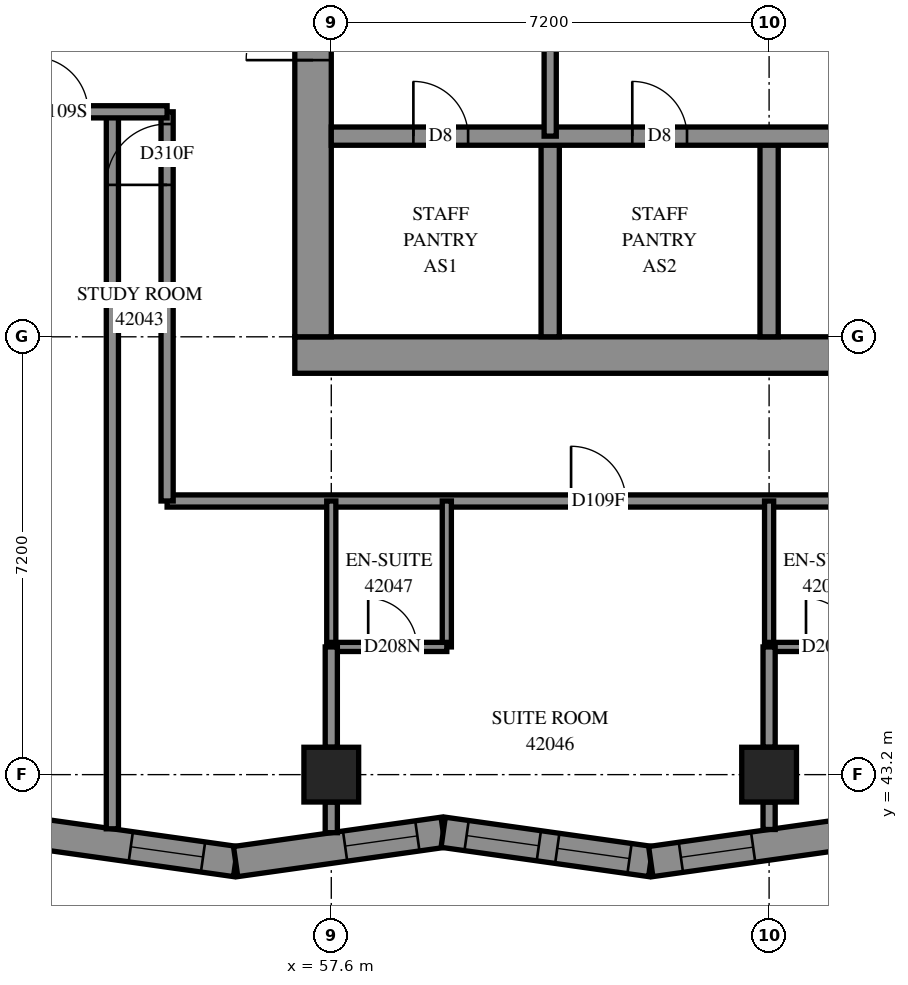
"""IFC4 building model, lengths in metres.
Left out: names, types, materials, properties, quantities, classifications, styles, units other than length and angle.
Written with IfcOpenShell. Run it as: python <this file> out.ifc"""

import sys

from ifc_helpers import new_model, si_unit, direction, frame, frame_2d, origin, origin_2d, place, context, subcontext, project, spatial, polyline, rectangle, outline, extrude, element, fill, save


model = new_model("IFC4")
c1 = context("Model", 3, precision=1e-05, world=origin(), true_north=direction((0.0, 1.0)))
c2 = subcontext(c1, "Body", "Model", "MODEL_VIEW")
j1 = project(units=[si_unit("LENGTHUNIT", "METRE"), si_unit("PLANEANGLEUNIT", "RADIAN")], contexts=[c1])
p1 = place(None, origin())
s1 = spatial("IfcSite", under=j1, at=p1, CompositionType="ELEMENT")
p2 = place(p1, origin())
s2 = spatial("IfcBuilding", under=s1, at=p2, CompositionType="ELEMENT")
p3 = place(p2, frame((0.0, 0.0, 155.8)))
s3 = spatial("IfcBuildingStorey", under=s2, at=p3, CompositionType="ELEMENT", Elevation=155.8)
for number, where, z_axis, x_axis in (
    (1, (57.6, 43.2, 0.0), (0.0, 0.0, 1.0), (1.0, 0.0, 0.0)),
    (2, (64.8, 43.2, 0.0), (0.0, 0.0, 1.0), (1.0, 0.0, 0.0)),
):
    element("IfcColumn", number, at=place(p3, frame(where, z_axis=z_axis, x_axis=x_axis)), inside=s3, PredefinedType="COLUMN", context=c2, shape_type="SweptSolid", body=[
        extrude(rectangle(XDim=0.9, YDim=0.9, at=origin_2d()), origin(), (0.0, 0.0, 1.0), 3.1),
    ])
p4 = place(p3, frame((57.0, 50.1, -0.3), z_axis=(0.0, 0.0, 1.0), x_axis=(1.0, 0.0, 0.0)))
e3 = element("IfcWall", 3, at=p4, inside=s3, PredefinedType="SHEAR", context=c2, shape_type="SweptSolid", body=[
    extrude(rectangle(XDim=15.6, YDim=0.6, at=frame_2d((7.8, 0.0))), origin(), (0.0, 0.0, 1.0), 2.7),
])
p5 = place(p3, frame((57.3, 50.4, -0.3), z_axis=(0.0, 0.0, 1.0), x_axis=(0.0, 1.0, 0.0)))
e4 = element("IfcWall", 4, at=p5, inside=s3, PredefinedType="SHEAR", context=c2, shape_type="SweptSolid", body=[
    extrude(rectangle(XDim=14.4, YDim=0.6, at=frame_2d((7.2, 0.0))), origin(), (0.0, 0.0, 1.0), 2.7),
])
p6 = place(p5, frame((4.55, 0.0, 0.3)))
e5 = element("IfcOpeningElement", 5, at=p6, cuts=e4, PredefinedType="OPENING", context=c2, shape_type="SweptSolid", body=[
    extrude(rectangle(XDim=1.1, YDim=2.1, at=frame_2d((0.55, 1.05))), frame((0.0, 0.31, 0.0), z_axis=(0.0, -1.0, 0.0), x_axis=(1.0, 0.0, 0.0)), (0.0, 0.0, 1.0), 0.62),
])
p7 = place(p5, frame((11.35, 0.0, 0.3)))
e6 = element("IfcOpeningElement", 6, at=p7, cuts=e4, PredefinedType="OPENING", context=c2, shape_type="SweptSolid", body=[
    extrude(rectangle(XDim=1.1, YDim=2.1, at=frame_2d((0.55, 1.05))), frame((0.0, 0.31, 0.0), z_axis=(0.0, -1.0, 0.0), x_axis=(1.0, 0.0, 0.0)), (0.0, 0.0, 1.0), 0.62),
])
for number, where, z_axis, x_axis in (
    (7, (61.2, 50.4, 0.0), (0.0, 0.0, 1.0), (0.0, 1.0, 0.0)),
    (8, (64.8, 50.4, 0.0), (0.0, 0.0, 1.0), (0.0, 1.0, 0.0)),
):
    element("IfcWall", number, at=place(p3, frame(where, z_axis=z_axis, x_axis=x_axis)), inside=s3, PredefinedType="SOLIDWALL", context=c2, shape_type="SweptSolid", body=[
        extrude(rectangle(XDim=3.3, YDim=0.3, at=frame_2d((1.65, 0.0))), origin(), (0.0, 0.0, 1.0), 3.1),
    ])
p8 = place(p3, frame((57.6, 53.7, 0.0), z_axis=(0.0, 0.0, 1.0), x_axis=(1.0, 0.0, 0.0)))
e9 = element("IfcWall", 9, at=p8, inside=s3, PredefinedType="SOLIDWALL", context=c2, shape_type="SweptSolid", body=[
    extrude(rectangle(XDim=14.4, YDim=0.3, at=frame_2d((7.2, 0.0))), origin(), (0.0, 0.0, 1.0), 3.1),
])
p9 = place(p8, frame((1.35, 0.0, 0.0)))
e10 = element("IfcOpeningElement", 10, at=p9, cuts=e9, PredefinedType="OPENING", context=c2, shape_type="SweptSolid", body=[
    extrude(rectangle(XDim=0.9, YDim=2.1, at=frame_2d((0.45, 1.05))), frame((0.0, 0.16, 0.0), z_axis=(0.0, -1.0, 0.0), x_axis=(1.0, 0.0, 0.0)), (0.0, 0.0, 1.0), 0.32),
])
p10 = place(p8, frame((4.95, 0.0, 0.0)))
e11 = element("IfcOpeningElement", 11, at=p10, cuts=e9, PredefinedType="OPENING", context=c2, shape_type="SweptSolid", body=[
    extrude(rectangle(XDim=0.9, YDim=2.1, at=frame_2d((0.45, 1.05))), frame((0.0, 0.16, 0.0), z_axis=(0.0, -1.0, 0.0), x_axis=(1.0, 0.0, 0.0)), (0.0, 0.0, 1.0), 0.32),
])
p11 = place(p8, frame((8.55, 0.0, 0.0)))
e12 = element("IfcOpeningElement", 12, at=p11, cuts=e9, PredefinedType="OPENING", context=c2, shape_type="SweptSolid", body=[
    extrude(rectangle(XDim=0.9, YDim=2.1, at=frame_2d((0.45, 1.05))), frame((0.0, 0.16, 0.0), z_axis=(0.0, -1.0, 0.0), x_axis=(1.0, 0.0, 0.0)), (0.0, 0.0, 1.0), 0.32),
])
p12 = place(p8, frame((12.05, 0.0, 0.0)))
e13 = element("IfcOpeningElement", 13, at=p12, cuts=e9, PredefinedType="OPENING", context=c2, shape_type="SweptSolid", body=[
    extrude(rectangle(XDim=1.1, YDim=2.1, at=frame_2d((0.55, 1.05))), frame((0.0, 0.16, 0.0), z_axis=(0.0, -1.0, 0.0), x_axis=(1.0, 0.0, 0.0)), (0.0, 0.0, 1.0), 0.32),
])
p13 = place(p3, frame((52.592, 42.255, 0.0), z_axis=(0.0, 0.0, 1.0), x_axis=(0.9901776599, -0.1398148844, 0.0)))
e14 = element("IfcWall", 14, at=p13, inside=s3, PredefinedType="SOLIDWALL", context=c2, shape_type="SweptSolid", body=[
    extrude(outline(polyline([(0.057, -0.25), (3.504, -0.25), (3.434, 0.25), (-0.057, 0.25), (0.057, -0.25)])), origin(), (0.0, 0.0, 1.0), 3.1),
])
p14 = place(p13, frame((1.728, 0.0, 0.45)))
e15 = element("IfcOpeningElement", 15, at=p14, cuts=e14, PredefinedType="OPENING", context=c2, shape_type="SweptSolid", body=[
    extrude(rectangle(XDim=1.2, YDim=2.5, at=frame_2d((0.6, 1.25))), frame((0.0, 0.26, 0.0), z_axis=(0.0, -1.0, 0.0), x_axis=(1.0, 0.0, 0.0)), (0.0, 0.0, 1.0), 0.52),
])
p15 = place(p3, frame((56.027, 41.77, 0.0), z_axis=(0.0, 0.0, 1.0), x_axis=(0.9901773547, 0.1398170455, 0.0)))
e16 = element("IfcWall", 16, at=p15, inside=s3, PredefinedType="SOLIDWALL", context=c2, shape_type="SweptSolid", body=[
    extrude(outline(polyline([(-0.035, -0.25), (3.412, -0.25), (3.483, 0.25), (0.035, 0.25), (-0.035, -0.25)])), origin(), (0.0, 0.0, 1.0), 3.1),
])
p16 = place(p15, frame((1.818, 0.0, 0.45)))
e17 = element("IfcOpeningElement", 17, at=p16, cuts=e16, PredefinedType="OPENING", context=c2, shape_type="SweptSolid", body=[
    extrude(rectangle(XDim=1.2, YDim=2.5, at=frame_2d((0.6, 1.25))), frame((0.0, 0.26, 0.0), z_axis=(0.0, -1.0, 0.0), x_axis=(1.0, 0.0, 0.0)), (0.0, 0.0, 1.0), 0.52),
])
p17 = place(p3, frame((59.44, 42.252, 0.0), z_axis=(0.0, 0.0, 1.0), x_axis=(0.9901773547, -0.1398170455, 0.0)))
e18 = element("IfcWall", 18, at=p17, inside=s3, PredefinedType="SOLIDWALL", context=c2, shape_type="SweptSolid", body=[
    extrude(outline(polyline([(0.035, -0.25), (3.483, -0.25), (3.412, 0.25), (-0.035, 0.25), (0.035, -0.25)])), origin(), (0.0, 0.0, 1.0), 3.1),
])
p18 = place(p17, frame((0.389, 0.0, 0.45)))
e19 = element("IfcOpeningElement", 19, at=p18, cuts=e18, PredefinedType="OPENING", context=c2, shape_type="SweptSolid", body=[
    extrude(rectangle(XDim=1.2, YDim=2.5, at=frame_2d((0.6, 1.25))), frame((0.0, 0.26, 0.0), z_axis=(0.0, -1.0, 0.0), x_axis=(1.0, 0.0, 0.0)), (0.0, 0.0, 1.0), 0.52),
])
p19 = place(p17, frame((1.895, 0.0, 0.45)))
e20 = element("IfcOpeningElement", 20, at=p19, cuts=e18, PredefinedType="OPENING", context=c2, shape_type="SweptSolid", body=[
    extrude(rectangle(XDim=1.2, YDim=2.5, at=frame_2d((0.6, 1.25))), frame((0.0, 0.26, 0.0), z_axis=(0.0, -1.0, 0.0), x_axis=(1.0, 0.0, 0.0)), (0.0, 0.0, 1.0), 0.52),
])
p20 = place(p3, frame((62.854, 41.77, 0.0), z_axis=(0.0, 0.0, 1.0), x_axis=(0.9901767876, 0.1398210616, 0.0)))
e21 = element("IfcWall", 21, at=p20, inside=s3, PredefinedType="SOLIDWALL", context=c2, shape_type="SweptSolid", body=[
    extrude(outline(polyline([(-0.035, -0.25), (3.412, -0.25), (3.483, 0.25), (0.035, 0.25), (-0.035, -0.25)])), origin(), (0.0, 0.0, 1.0), 3.1),
])
p21 = place(p20, frame((0.5, 0.0, 0.45)))
e22 = element("IfcOpeningElement", 22, at=p21, cuts=e21, PredefinedType="OPENING", context=c2, shape_type="SweptSolid", body=[
    extrude(rectangle(XDim=1.2, YDim=2.5, at=frame_2d((0.6, 1.25))), frame((0.0, 0.26, 0.0), z_axis=(0.0, -1.0, 0.0), x_axis=(1.0, 0.0, 0.0)), (0.0, 0.0, 1.0), 0.52),
])
p22 = place(p3, frame((61.2, 53.7, 0.0), z_axis=(0.0, 0.0, 1.0), x_axis=(0.0, 1.0, 0.0)))
e23 = element("IfcWall", 23, at=p22, inside=s3, PredefinedType="PARTITIONING", context=c2, shape_type="SweptSolid", body=[
    extrude(rectangle(XDim=3.6, YDim=0.2, at=frame_2d((1.8, 0.0))), origin(), (0.0, 0.0, 1.0), 3.1),
])
p23 = place(p3, frame((54.9, 47.7, 0.0), z_axis=(0.0, 0.0, 1.0), x_axis=(1.0, 0.0, 0.0)))
e24 = element("IfcWall", 24, at=p23, inside=s3, PredefinedType="PARTITIONING", context=c2, shape_type="SweptSolid", body=[
    extrude(rectangle(XDim=19.326, YDim=0.2, at=frame_2d((9.663, 0.0))), origin(), (0.0, 0.0, 1.0), 3.1),
])
p24 = place(p23, frame((6.643, 0.0, 0.0)))
e25 = element("IfcOpeningElement", 25, at=p24, cuts=e24, PredefinedType="OPENING", context=c2, shape_type="SweptSolid", body=[
    extrude(rectangle(XDim=0.9, YDim=2.1, at=frame_2d((0.45, 1.05))), frame((0.0, 0.11, 0.0), z_axis=(0.0, -1.0, 0.0), x_axis=(1.0, 0.0, 0.0)), (0.0, 0.0, 1.0), 0.22),
])
p25 = place(p23, frame((13.843, 0.0, 0.0)))
e26 = element("IfcOpeningElement", 26, at=p25, cuts=e24, PredefinedType="OPENING", context=c2, shape_type="SweptSolid", body=[
    extrude(rectangle(XDim=0.9, YDim=2.1, at=frame_2d((0.45, 1.05))), frame((0.0, 0.11, 0.0), z_axis=(0.0, -1.0, 0.0), x_axis=(1.0, 0.0, 0.0)), (0.0, 0.0, 1.0), 0.22),
])
p26 = place(p3, frame((54.0, 42.309, 0.0), z_axis=(0.0, 0.0, 1.0), x_axis=(0.0, 1.0, 0.0)))
e27 = element("IfcWall", 27, at=p26, inside=s3, PredefinedType="PARTITIONING", context=c2, shape_type="SweptSolid", body=[
    extrude(rectangle(XDim=11.791, YDim=0.2, at=frame_2d((5.895, 0.0))), origin(), (0.0, 0.0, 1.0), 3.1),
])
p27 = place(p3, frame((54.9, 47.7, 0.0), z_axis=(0.0, 0.0, 1.0), x_axis=(0.0, 1.0, 0.0)))
e28 = element("IfcWall", 28, at=p27, inside=s3, PredefinedType="PARTITIONING", context=c2, shape_type="SweptSolid", body=[
    extrude(rectangle(XDim=6.4, YDim=0.2, at=frame_2d((3.2, 0.0))), origin(), (0.0, 0.0, 1.0), 3.1),
])
p28 = place(p27, frame((5.199, 0.0, 0.0)))
e29 = element("IfcOpeningElement", 29, at=p28, cuts=e28, PredefinedType="OPENING", context=c2, shape_type="SweptSolid", body=[
    extrude(rectangle(XDim=1.0, YDim=2.1, at=frame_2d((0.5, 1.05))), frame((0.0, 0.11, 0.0), z_axis=(0.0, -1.0, 0.0), x_axis=(1.0, 0.0, 0.0)), (0.0, 0.0, 1.0), 0.22),
])
p29 = place(p3, frame((50.4, 54.1, 0.0), z_axis=(0.0, 0.0, 1.0), x_axis=(1.0, 0.0, 0.0)))
e30 = element("IfcWall", 30, at=p29, inside=s3, PredefinedType="PARTITIONING", context=c2, shape_type="SweptSolid", body=[
    extrude(rectangle(XDim=4.5, YDim=0.2, at=frame_2d((2.25, 0.0))), origin(), (0.0, 0.0, 1.0), 3.1),
])
p30 = place(p29, frame((2.3, 0.0, 0.0)))
e31 = element("IfcOpeningElement", 31, at=p30, cuts=e30, PredefinedType="OPENING", context=c2, shape_type="SweptSolid", body=[
    extrude(rectangle(XDim=0.9, YDim=2.1, at=frame_2d((0.45, 1.05))), frame((0.0, 0.11, 0.0), z_axis=(0.0, -1.0, 0.0), x_axis=(1.0, 0.0, 0.0)), (0.0, 0.0, 1.0), 0.22),
])
for number, where, z_axis, x_axis in (
    (32, (59.5, 45.3, 0.0), (0.0, 0.0, 1.0), (0.0, 1.0, 0.0)),
    (33, (57.6, 45.3, 0.0), (0.0, 0.0, 1.0), (0.0, 1.0, 0.0)),
    (34, (64.8, 45.3, 0.0), (0.0, 0.0, 1.0), (0.0, 1.0, 0.0)),
):
    element("IfcWall", number, at=place(p3, frame(where, z_axis=z_axis, x_axis=x_axis)), inside=s3, PredefinedType="PARTITIONING", context=c2, shape_type="SweptSolid", body=[
        extrude(rectangle(XDim=2.4, YDim=0.15, at=frame_2d((1.2, 0.0))), origin(), (0.0, 0.0, 1.0), 3.1),
    ])
p31 = place(p3, frame((64.8, 45.3, 0.0), z_axis=(0.0, 0.0, 1.0), x_axis=(1.0, 0.0, 0.0)))
e35 = element("IfcWall", 35, at=p31, inside=s3, PredefinedType="PARTITIONING", context=c2, shape_type="SweptSolid", body=[
    extrude(rectangle(XDim=1.9, YDim=0.15, at=frame_2d((0.95, 0.0))), origin(), (0.0, 0.0, 1.0), 3.1),
])
p32 = place(p31, frame((0.607, 0.0, 0.0)))
e36 = element("IfcOpeningElement", 36, at=p32, cuts=e35, PredefinedType="OPENING", context=c2, shape_type="SweptSolid", body=[
    extrude(rectangle(XDim=0.8, YDim=2.1, at=frame_2d((0.4, 1.05))), frame((0.0, 0.085, 0.0), z_axis=(0.0, -1.0, 0.0), x_axis=(1.0, 0.0, 0.0)), (0.0, 0.0, 1.0), 0.17),
])
p33 = place(p3, frame((57.6, 45.3, 0.0), z_axis=(0.0, 0.0, 1.0), x_axis=(1.0, 0.0, 0.0)))
e37 = element("IfcWall", 37, at=p33, inside=s3, PredefinedType="PARTITIONING", context=c2, shape_type="SweptSolid", body=[
    extrude(rectangle(XDim=1.9, YDim=0.15, at=frame_2d((0.95, 0.0))), origin(), (0.0, 0.0, 1.0), 3.1),
])
p34 = place(p33, frame((0.607, 0.0, 0.0)))
e38 = element("IfcOpeningElement", 38, at=p34, cuts=e37, PredefinedType="OPENING", context=c2, shape_type="SweptSolid", body=[
    extrude(rectangle(XDim=0.8, YDim=2.1, at=frame_2d((0.4, 1.05))), frame((0.0, 0.085, 0.0), z_axis=(0.0, -1.0, 0.0), x_axis=(1.0, 0.0, 0.0)), (0.0, 0.0, 1.0), 0.17),
])
for number, where, z_axis, x_axis in (
    (39, (57.6, 43.65, 0.0), (0.0, 0.0, 1.0), (0.0, 1.0, 0.0)),
    (40, (64.8, 43.65, 0.0), (0.0, 0.0, 1.0), (0.0, 1.0, 0.0)),
):
    element("IfcWall", number, at=place(p3, frame(where, z_axis=z_axis, x_axis=x_axis)), inside=s3, PredefinedType="PARTITIONING", context=c2, shape_type="SweptSolid", body=[
        extrude(rectangle(XDim=1.65, YDim=0.2, at=frame_2d((0.825, 0.0))), origin(), (0.0, 0.0, 1.0), 3.1),
    ])
p35 = place(p3, frame((57.6, 42.245, 0.0), z_axis=(0.0, 0.0, 1.0), x_axis=(0.0, 1.0, 0.0)))
e41 = element("IfcWall", 41, at=p35, inside=s3, PredefinedType="PARTITIONING", context=c2, shape_type="SweptSolid", body=[
    extrude(rectangle(XDim=0.505, YDim=0.2, at=frame_2d((0.253, 0.0))), origin(), (0.0, 0.0, 1.0), 3.1),
])
p36 = place(p3, frame((64.8, 42.298, 0.0), z_axis=(0.0, 0.0, 1.0), x_axis=(0.0, 1.0, 0.0)))
e42 = element("IfcWall", 42, at=p36, inside=s3, PredefinedType="PARTITIONING", context=c2, shape_type="SweptSolid", body=[
    extrude(rectangle(XDim=0.452, YDim=0.2, at=frame_2d((0.226, 0.0))), origin(), (0.0, 0.0, 1.0), 3.1),
])
p37 = place(p14, origin())
e43 = element("IfcWindow", 43, at=p37, inside=s3, PartitioningType="SINGLE_PANEL", PredefinedType="WINDOW", context=c2, shape_type="SweptSolid", body=[
    extrude(rectangle(XDim=1.2, YDim=2.5, at=frame_2d((0.6, 1.25))), frame((0.0, 0.18, 0.0), z_axis=(0.0, -1.0, 0.0), x_axis=(1.0, 0.0, 0.0)), (0.0, 0.0, 1.0), 0.06),
])
fill(e15, e43)
p38 = place(p16, origin())
e44 = element("IfcWindow", 44, at=p38, inside=s3, PartitioningType="SINGLE_PANEL", PredefinedType="WINDOW", context=c2, shape_type="SweptSolid", body=[
    extrude(rectangle(XDim=1.2, YDim=2.5, at=frame_2d((0.6, 1.25))), frame((0.0, 0.18, 0.0), z_axis=(0.0, -1.0, 0.0), x_axis=(1.0, 0.0, 0.0)), (0.0, 0.0, 1.0), 0.06),
])
fill(e17, e44)
p39 = place(p18, origin())
e45 = element("IfcWindow", 45, at=p39, inside=s3, PartitioningType="SINGLE_PANEL", PredefinedType="WINDOW", context=c2, shape_type="SweptSolid", body=[
    extrude(rectangle(XDim=1.2, YDim=2.5, at=frame_2d((0.6, 1.25))), frame((0.0, 0.18, 0.0), z_axis=(0.0, -1.0, 0.0), x_axis=(1.0, 0.0, 0.0)), (0.0, 0.0, 1.0), 0.06),
])
fill(e19, e45)
p40 = place(p19, origin())
e46 = element("IfcWindow", 46, at=p40, inside=s3, PartitioningType="SINGLE_PANEL", PredefinedType="WINDOW", context=c2, shape_type="SweptSolid", body=[
    extrude(rectangle(XDim=1.2, YDim=2.5, at=frame_2d((0.6, 1.25))), frame((0.0, 0.18, 0.0), z_axis=(0.0, -1.0, 0.0), x_axis=(1.0, 0.0, 0.0)), (0.0, 0.0, 1.0), 0.06),
])
fill(e20, e46)
p41 = place(p21, origin())
e47 = element("IfcWindow", 47, at=p41, inside=s3, PartitioningType="SINGLE_PANEL", PredefinedType="WINDOW", context=c2, shape_type="SweptSolid", body=[
    extrude(rectangle(XDim=1.2, YDim=2.5, at=frame_2d((0.6, 1.25))), frame((0.0, 0.18, 0.0), z_axis=(0.0, -1.0, 0.0), x_axis=(1.0, 0.0, 0.0)), (0.0, 0.0, 1.0), 0.06),
])
fill(e22, e47)
p42 = place(p6, origin())
e48 = element("IfcDoor", 48, at=p42, inside=s3, OperationType="DOUBLE_DOOR_SINGLE_SWING", PredefinedType="DOOR", context=c2, shape_type="SweptSolid", body=[
    extrude(rectangle(XDim=1.1, YDim=2.1, at=frame_2d((0.55, 1.05))), frame((0.0, 0.025, 0.0), z_axis=(0.0, -1.0, 0.0), x_axis=(1.0, 0.0, 0.0)), (0.0, 0.0, 1.0), 0.05),
])
fill(e5, e48)
p43 = place(p9, origin())
e49 = element("IfcDoor", 49, at=p43, inside=s3, OperationType="SINGLE_SWING_LEFT", PredefinedType="DOOR", context=c2, shape_type="SweptSolid", body=[
    extrude(rectangle(XDim=0.9, YDim=2.1, at=frame_2d((0.45, 1.05))), frame((0.0, 0.025, 0.0), z_axis=(0.0, -1.0, 0.0), x_axis=(1.0, 0.0, 0.0)), (0.0, 0.0, 1.0), 0.05),
])
fill(e10, e49)
p44 = place(p10, origin())
e50 = element("IfcDoor", 50, at=p44, inside=s3, OperationType="SINGLE_SWING_LEFT", PredefinedType="DOOR", context=c2, shape_type="SweptSolid", body=[
    extrude(rectangle(XDim=0.9, YDim=2.1, at=frame_2d((0.45, 1.05))), frame((0.0, 0.025, 0.0), z_axis=(0.0, -1.0, 0.0), x_axis=(1.0, 0.0, 0.0)), (0.0, 0.0, 1.0), 0.05),
])
fill(e11, e50)
p45 = place(p30, origin())
e51 = element("IfcDoor", 51, at=p45, inside=s3, OperationType="SINGLE_SWING_LEFT", PredefinedType="DOOR", context=c2, shape_type="SweptSolid", body=[
    extrude(rectangle(XDim=0.9, YDim=2.1, at=frame_2d((0.45, 1.05))), frame((0.0, 0.025, 0.0), z_axis=(0.0, -1.0, 0.0), x_axis=(1.0, 0.0, 0.0)), (0.0, 0.0, 1.0), 0.05),
])
fill(e31, e51)
p46 = place(p28, origin())
e52 = element("IfcDoor", 52, at=p46, inside=s3, OperationType="SINGLE_SWING_RIGHT", PredefinedType="DOOR", context=c2, shape_type="SweptSolid", body=[
    extrude(rectangle(XDim=1.0, YDim=2.1, at=frame_2d((0.5, 1.05))), frame((0.0, 0.025, 0.0), z_axis=(0.0, -1.0, 0.0), x_axis=(1.0, 0.0, 0.0)), (0.0, 0.0, 1.0), 0.05),
])
fill(e29, e52)
p47 = place(p24, origin())
e53 = element("IfcDoor", 53, at=p47, inside=s3, OperationType="SINGLE_SWING_LEFT", PredefinedType="DOOR", context=c2, shape_type="SweptSolid", body=[
    extrude(rectangle(XDim=0.9, YDim=2.1, at=frame_2d((0.45, 1.05))), frame((0.0, 0.025, 0.0), z_axis=(0.0, -1.0, 0.0), x_axis=(1.0, 0.0, 0.0)), (0.0, 0.0, 1.0), 0.05),
])
fill(e25, e53)
p48 = place(p34, origin())
e54 = element("IfcDoor", 54, at=p48, inside=s3, OperationType="SINGLE_SWING_RIGHT", PredefinedType="DOOR", context=c2, shape_type="SweptSolid", body=[
    extrude(rectangle(XDim=0.8, YDim=2.1, at=frame_2d((0.4, 1.05))), frame((0.0, 0.025, 0.0), z_axis=(0.0, -1.0, 0.0), x_axis=(1.0, 0.0, 0.0)), (0.0, 0.0, 1.0), 0.05),
])
fill(e38, e54)
p49 = place(p32, origin())
e55 = element("IfcDoor", 55, at=p49, inside=s3, OperationType="SINGLE_SWING_RIGHT", PredefinedType="DOOR", context=c2, shape_type="SweptSolid", body=[
    extrude(rectangle(XDim=0.8, YDim=2.1, at=frame_2d((0.4, 1.05))), frame((0.0, 0.025, 0.0), z_axis=(0.0, -1.0, 0.0), x_axis=(1.0, 0.0, 0.0)), (0.0, 0.0, 1.0), 0.05),
])
fill(e36, e55)
save(model, sys.argv[1])
